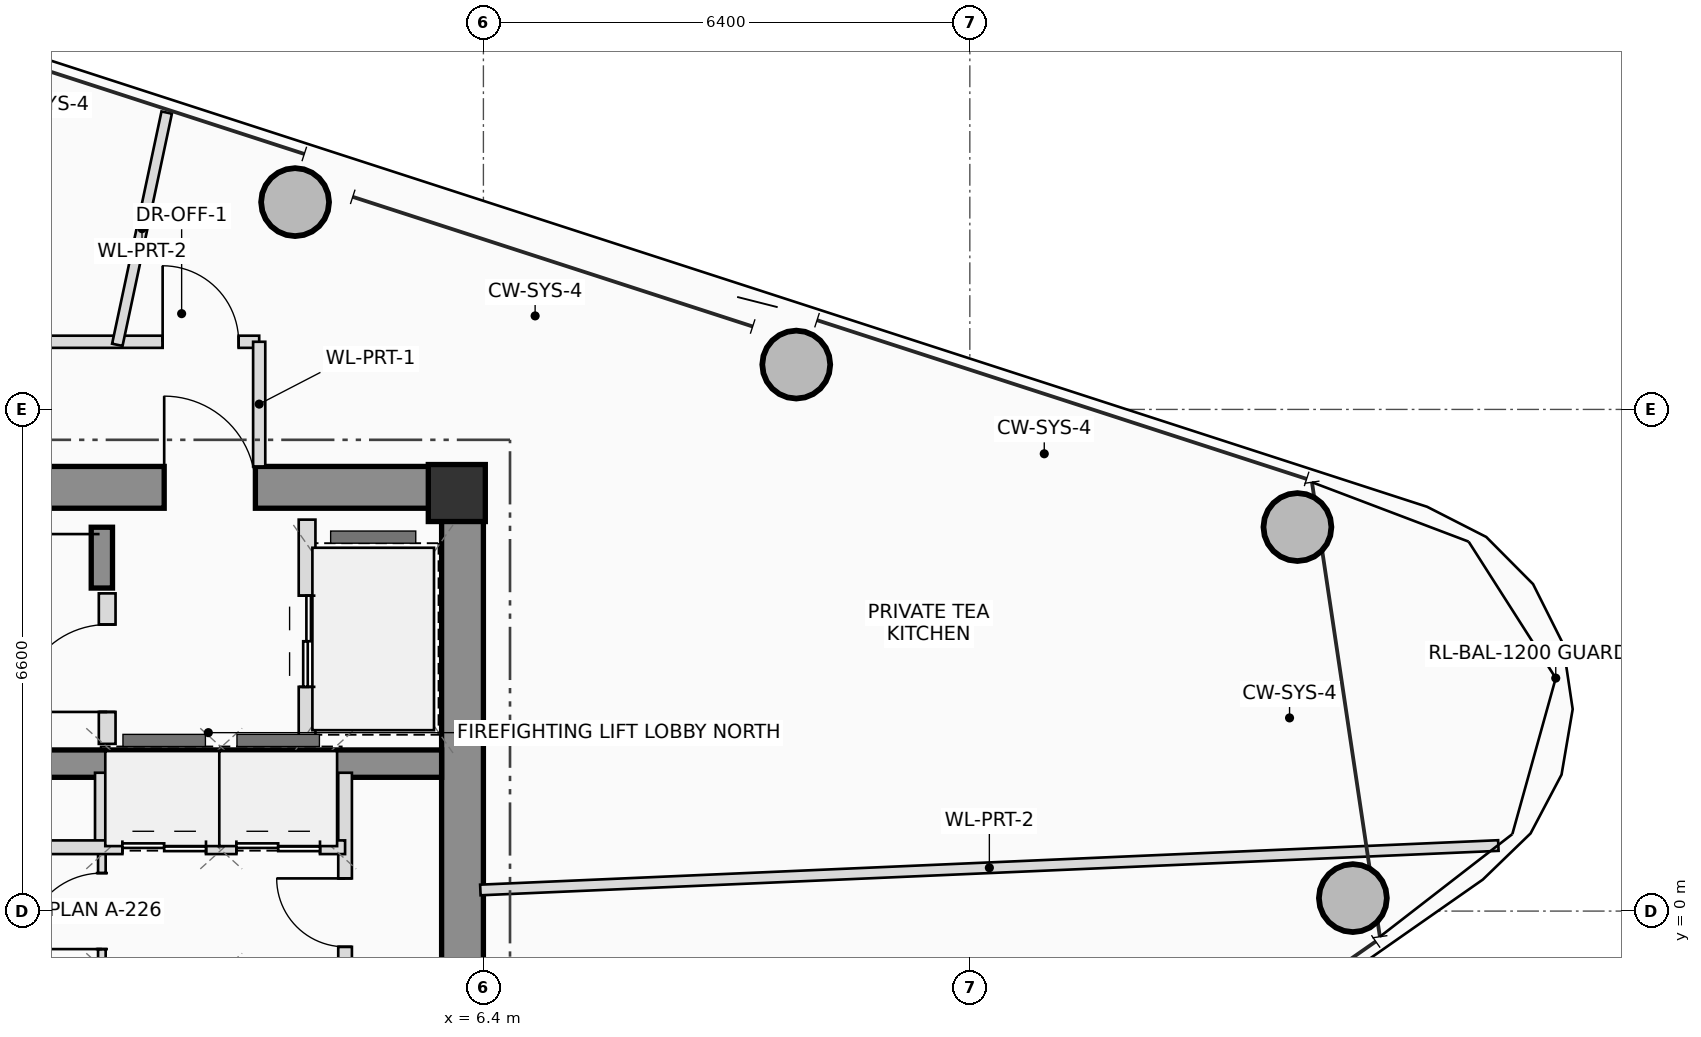
"""IFC4 building model, lengths in metres.
Left out: names, types, materials, properties, quantities, classifications, styles, units other than length and angle.
Written with IfcOpenShell. Run it as: python <this file> out.ifc"""

import sys

from ifc_helpers import new_model, si_unit, direction, frame, frame_2d, origin, origin_2d, place, context, subcontext, project, spatial, rectangle, hollow_circle, extrude, source, transform, mapped, element, fill, save


model = new_model("IFC4")
c1 = context("Model", 3, precision=1e-05, world=origin(), true_north=direction((0.0, 1.0)))
c2 = subcontext(c1, "Body", "Model", "MODEL_VIEW")
j1 = project(units=[si_unit("LENGTHUNIT", "METRE"), si_unit("PLANEANGLEUNIT", "RADIAN")], contexts=[c1])
p1 = place(None, origin())
s1 = spatial("IfcSite", under=j1, at=p1, CompositionType="ELEMENT")
p2 = place(p1, origin())
s2 = spatial("IfcBuilding", under=s1, at=p2, CompositionType="ELEMENT")
p3 = place(p2, frame((0.0, 0.0, 281.35)))
s3 = spatial("IfcBuildingStorey", under=s2, at=p3, CompositionType="ELEMENT", Elevation=281.35)
m1 = source(origin(), c2, "Body", "SweptSolid", [
    extrude(rectangle(XDim=0.75, YDim=0.75, at=origin_2d()), origin(), (0.0, 0.0, 1.0), 3.4),
])
p4 = place(p3, frame((6.05, 5.5, 0.0), z_axis=(0.0, 0.0, 1.0), x_axis=(1.0, 0.0, 0.0)))
e1 = element("IfcColumn", 1, at=p4, inside=s3, PredefinedType="COLUMN", context=c2, shape_type="MappedRepresentation", body=[
    mapped(m1, transform((0.0, 0.0, 0.0), scale=1.0)),
])
p5 = place(p3, frame((-6.4, 5.575, 0.0), z_axis=(0.0, 0.0, 1.0), x_axis=(1.0, 0.0, 0.0)))
e2 = element("IfcWall", 2, at=p5, inside=s3, PredefinedType="SHEAR", context=c2, shape_type="SweptSolid", body=[
    extrude(rectangle(XDim=12.8, YDim=0.55, at=frame_2d((6.4, 0.0))), origin(), (0.0, 0.0, 1.0), 3.4),
])
p6 = place(p5, frame((8.6, 0.0, 0.0)))
e3 = element("IfcOpeningElement", 3, at=p6, cuts=e2, PredefinedType="OPENING", context=c2, shape_type="SweptSolid", body=[
    extrude(rectangle(XDim=1.2, YDim=2.2, at=frame_2d((0.6, 1.1))), frame((0.0, 0.285, 0.0), z_axis=(0.0, -1.0, 0.0), x_axis=(1.0, 0.0, 0.0)), (0.0, 0.0, 1.0), 0.57),
])
p7 = place(p3, frame((6.125, -5.3, 0.0), z_axis=(0.0, 0.0, 1.0), x_axis=(0.0, 1.0, 0.0)))
e4 = element("IfcWall", 4, at=p7, inside=s3, PredefinedType="SHEAR", context=c2, shape_type="SweptSolid", body=[
    extrude(rectangle(XDim=10.6, YDim=0.55, at=frame_2d((5.3, 0.0))), origin(), (0.0, 0.0, 1.0), 3.4),
])
p8 = place(p3, frame((-5.85, 1.94, 0.0), z_axis=(0.0, 0.0, 1.0), x_axis=(1.0, 0.0, 0.0)))
e5 = element("IfcWall", 5, at=p8, inside=s3, PredefinedType="SHEAR", context=c2, shape_type="SweptSolid", body=[
    extrude(rectangle(XDim=11.7, YDim=0.36, at=frame_2d((5.85, 0.0))), origin(), (0.0, 0.0, 1.0), 3.4),
])
p9 = place(p3, frame((1.38, 4.25, 0.0), z_axis=(0.0, 0.0, 1.0), x_axis=(0.0, 1.0, 0.0)))
e6 = element("IfcWall", 6, at=p9, inside=s3, PredefinedType="SHEAR", context=c2, shape_type="SweptSolid", body=[
    extrude(rectangle(XDim=0.8, YDim=0.28, at=frame_2d((0.4, 0.0))), origin(), (0.0, 0.0, 1.0), 3.4),
])
m2 = source(origin(), c2, "Body", "SweptSolid", [
    extrude(hollow_circle(Radius=0.45, WallThickness=0.032, at=origin_2d()), origin(), (0.0, 0.0, 1.0), 3.4),
])
for number, where, z_axis, x_axis in (
    (7, (17.84, 0.171, 0.0), (0.0, 0.0, 1.0), (1.0, 0.0, 0.0)),
    (8, (17.11, 5.052, 0.0), (0.0, 0.0, 1.0), (1.0, 0.0, 0.0)),
    (9, (10.516, 7.19, 0.0), (0.0, 0.0, 1.0), (1.0, 0.0, 0.0)),
    (10, (3.922, 9.327, 0.0), (0.0, 0.0, 1.0), (1.0, 0.0, 0.0)),
):
    element("IfcColumn", number, at=place(p3, frame(where, z_axis=z_axis, x_axis=x_axis)), inside=s3, PredefinedType="COLUMN", context=c2, shape_type="MappedRepresentation", body=[
        mapped(m2, transform((0.0, 0.0, 0.0), scale=1.0)),
    ])
p10 = place(p3, frame((1.45, 2.2, 0.0), z_axis=(0.0, 0.0, 1.0), x_axis=(0.0, 1.0, 0.0)))
e11 = element("IfcWall", 11, at=p10, inside=s3, PredefinedType="PLUMBINGWALL", context=c2, shape_type="SweptSolid", body=[
    extrude(rectangle(XDim=1.98, YDim=0.22, at=frame_2d((0.99, 0.0))), origin(), (0.0, 0.0, 1.0), 3.16),
])
p11 = place(p10, frame((0.42, 0.0, 0.0)))
e12 = element("IfcOpeningElement", 12, at=p11, cuts=e11, PredefinedType="OPENING", context=c2, shape_type="SweptSolid", body=[
    extrude(rectangle(XDim=1.15, YDim=2.15, at=frame_2d((0.575, 1.075))), frame((0.0, 0.12, 0.0), z_axis=(0.0, -1.0, 0.0), x_axis=(1.0, 0.0, 0.0)), (0.0, 0.0, 1.0), 0.24),
])
p12 = place(p3, frame((4.08, 2.2, 0.0), z_axis=(0.0, 0.0, 1.0), x_axis=(0.0, 1.0, 0.0)))
e13 = element("IfcWall", 13, at=p12, inside=s3, PredefinedType="PLUMBINGWALL", context=c2, shape_type="SweptSolid", body=[
    extrude(rectangle(XDim=2.95, YDim=0.22, at=frame_2d((1.475, 0.0))), origin(), (0.0, 0.0, 1.0), 3.16),
])
p13 = place(p12, frame((0.75, 0.0, 0.0)))
e14 = element("IfcOpeningElement", 14, at=p13, cuts=e13, PredefinedType="OPENING", context=c2, shape_type="SweptSolid", body=[
    extrude(rectangle(XDim=1.2, YDim=2.25, at=frame_2d((0.6, 1.125))), frame((0.0, 0.12, 0.0), z_axis=(0.0, -1.0, 0.0), x_axis=(1.0, 0.0, 0.0)), (0.0, 0.0, 1.0), 0.24),
])
p14 = place(p3, frame((1.38, -0.84, 0.0), z_axis=(0.0, 0.0, 1.0), x_axis=(0.0, 1.0, 0.0)))
e15 = element("IfcWall", 15, at=p14, inside=s3, PredefinedType="PARTITIONING", context=c2, shape_type="SweptSolid", body=[
    extrude(rectangle(XDim=1.68, YDim=0.1, at=frame_2d((0.84, 0.0))), origin(), (0.0, 0.0, 1.0), 3.16),
])
p15 = place(p14, frame((0.34, 0.0, 0.0)))
e16 = element("IfcOpeningElement", 16, at=p15, cuts=e15, PredefinedType="OPENING", context=c2, shape_type="SweptSolid", body=[
    extrude(rectangle(XDim=1.0, YDim=2.25, at=frame_2d((0.5, 1.125))), frame((0.0, 0.06, 0.0), z_axis=(0.0, -1.0, 0.0), x_axis=(1.0, 0.0, 0.0)), (0.0, 0.0, 1.0), 0.12),
])
for number, where, z_axis, x_axis in (
    (17, (1.38, 0.84, 0.0), (0.0, 0.0, 1.0), (0.0, 1.0, 0.0)),
    (18, (3.02, 0.84, 0.0), (0.0, 0.0, 1.0), (0.0, 1.0, 0.0)),
    (19, (4.38, 0.84, 0.0), (0.0, 0.0, 1.0), (0.0, 1.0, 0.0)),
):
    element("IfcWall", number, at=place(p3, frame(where, z_axis=z_axis, x_axis=x_axis)), inside=s3, PredefinedType="PLUMBINGWALL", context=c2, shape_type="SweptSolid", body=[
        extrude(rectangle(XDim=0.98, YDim=0.18, at=frame_2d((0.49, 0.0))), origin(), (0.0, 0.0, 1.0), 3.16),
    ])
p16 = place(p3, frame((4.58, -1.82, 0.0), z_axis=(0.0, 0.0, 1.0), x_axis=(0.0, 1.0, 0.0)))
e20 = element("IfcWall", 20, at=p16, inside=s3, PredefinedType="PLUMBINGWALL", context=c2, shape_type="SweptSolid", body=[
    extrude(rectangle(XDim=3.64, YDim=0.18, at=frame_2d((1.82, 0.0))), origin(), (0.0, 0.0, 1.0), 3.16),
])
p17 = place(p16, frame((1.35, 0.0, 0.0)))
e21 = element("IfcOpeningElement", 21, at=p17, cuts=e20, PredefinedType="OPENING", context=c2, shape_type="SweptSolid", body=[
    extrude(rectangle(XDim=0.9, YDim=2.05, at=frame_2d((0.45, 1.025))), frame((0.0, 0.1, 0.0), z_axis=(0.0, -1.0, 0.0), x_axis=(1.0, 0.0, 0.0)), (0.0, 0.0, 1.0), 0.2),
])
p18 = place(p3, frame((-5.68, 0.84, 0.0), z_axis=(0.0, 0.0, 1.0), x_axis=(1.0, 0.0, 0.0)))
e22 = element("IfcWall", 22, at=p18, inside=s3, PredefinedType="PLUMBINGWALL", context=c2, shape_type="SweptSolid", body=[
    extrude(rectangle(XDim=10.26, YDim=0.18, at=frame_2d((5.13, 0.0))), origin(), (0.0, 0.0, 1.0), 3.16),
])
p19 = place(p18, frame((0.91, 0.0, 0.0)))
e23 = element("IfcOpeningElement", 23, at=p19, cuts=e22, PredefinedType="OPENING", context=c2, shape_type="SweptSolid", body=[
    extrude(rectangle(XDim=0.9, YDim=2.05, at=frame_2d((0.45, 1.025))), frame((0.0, 0.1, 0.0), z_axis=(0.0, -1.0, 0.0), x_axis=(1.0, 0.0, 0.0)), (0.0, 0.0, 1.0), 0.2),
])
p20 = place(p18, frame((4.38, 0.0, 0.0)))
e24 = element("IfcOpeningElement", 24, at=p20, cuts=e22, PredefinedType="OPENING", context=c2, shape_type="SweptSolid", body=[
    extrude(rectangle(XDim=0.9, YDim=2.05, at=frame_2d((0.45, 1.025))), frame((0.0, 0.1, 0.0), z_axis=(0.0, -1.0, 0.0), x_axis=(1.0, 0.0, 0.0)), (0.0, 0.0, 1.0), 0.2),
])
p21 = place(p18, frame((7.33, 0.0, 0.0)))
e25 = element("IfcOpeningElement", 25, at=p21, cuts=e22, PredefinedType="OPENING", context=c2, shape_type="SweptSolid", body=[
    extrude(rectangle(XDim=1.1, YDim=2.2, at=frame_2d((0.55, 1.1))), frame((0.0, 0.1, 0.0), z_axis=(0.0, -1.0, 0.0), x_axis=(1.0, 0.0, 0.0)), (0.0, 0.0, 1.0), 0.2),
])
p22 = place(p18, frame((8.83, 0.0, 0.0)))
e26 = element("IfcOpeningElement", 26, at=p22, cuts=e22, PredefinedType="OPENING", context=c2, shape_type="SweptSolid", body=[
    extrude(rectangle(XDim=1.1, YDim=2.2, at=frame_2d((0.55, 1.1))), frame((0.0, 0.1, 0.0), z_axis=(0.0, -1.0, 0.0), x_axis=(1.0, 0.0, 0.0)), (0.0, 0.0, 1.0), 0.2),
])
p23 = place(p3, frame((-6.36, 7.49, 0.0), z_axis=(0.0, 0.0, 1.0), x_axis=(1.0, 0.0, 0.0)))
e27 = element("IfcWall", 27, at=p23, inside=s3, PredefinedType="PARTITIONING", context=c2, shape_type="SweptSolid", body=[
    extrude(rectangle(XDim=9.81, YDim=0.16, at=frame_2d((4.905, 0.0))), origin(), (0.0, 0.0, 1.0), 2.565),
])
p24 = place(p23, frame((4.253, 0.0, 0.0)))
e28 = element("IfcOpeningElement", 28, at=p24, cuts=e27, PredefinedType="OPENING", context=c2, shape_type="SweptSolid", body=[
    extrude(rectangle(XDim=1.0, YDim=2.25, at=frame_2d((0.5, 1.125))), frame((0.0, 0.09, 0.0), z_axis=(0.0, -1.0, 0.0), x_axis=(1.0, 0.0, 0.0)), (0.0, 0.0, 1.0), 0.18),
])
p25 = place(p23, frame((8.54, 0.0, 0.0)))
e29 = element("IfcOpeningElement", 29, at=p25, cuts=e27, PredefinedType="OPENING", context=c2, shape_type="SweptSolid", body=[
    extrude(rectangle(XDim=1.0, YDim=2.25, at=frame_2d((0.5, 1.125))), frame((0.0, 0.09, 0.0), z_axis=(0.0, -1.0, 0.0), x_axis=(1.0, 0.0, 0.0)), (0.0, 0.0, 1.0), 0.18),
])
p26 = place(p3, frame((3.45, 7.49, 0.0), z_axis=(0.0, 0.0, 1.0), x_axis=(0.0, -1.0, 0.0)))
e30 = element("IfcWall", 30, at=p26, inside=s3, PredefinedType="PARTITIONING", context=c2, shape_type="SweptSolid", body=[
    extrude(rectangle(XDim=1.64, YDim=0.16, at=frame_2d((0.82, 0.0))), origin(), (0.0, 0.0, 1.0), 2.765),
])
p27 = place(p3, frame((6.36, 0.278, 0.0), z_axis=(0.0, 0.0, 1.0), x_axis=(0.999047617824, 0.043633213494, 0.0)))
e31 = element("IfcWall", 31, at=p27, inside=s3, PredefinedType="PARTITIONING", context=c2, shape_type="SweptSolid", body=[
    extrude(rectangle(XDim=13.406, YDim=0.14, at=frame_2d((6.703, 0.0))), origin(), (0.0, 0.0, 1.0), 2.565),
])
p28 = place(p3, frame((1.583, 7.45, 0.0), z_axis=(0.0, 0.0, 1.0), x_axis=(0.20788492722, 0.978153289129, 0.0)))
e32 = element("IfcWall", 32, at=p28, inside=s3, PredefinedType="PARTITIONING", context=c2, shape_type="SweptSolid", body=[
    extrude(rectangle(XDim=3.124, YDim=0.14, at=frame_2d((1.562, 0.0))), origin(), (0.0, 0.0, 1.0), 2.725),
])
p29 = place(p6, origin())
e33 = element("IfcDoor", 33, at=p29, inside=s3, OperationType="SINGLE_SWING_LEFT", PredefinedType="DOOR", context=c2, shape_type="SweptSolid", body=[
    extrude(rectangle(XDim=1.2, YDim=2.2, at=frame_2d((0.6, 1.1))), frame((0.0, 0.025, 0.0), z_axis=(0.0, -1.0, 0.0), x_axis=(1.0, 0.0, 0.0)), (0.0, 0.0, 1.0), 0.05),
])
fill(e3, e33)
p30 = place(p11, origin())
e34 = element("IfcDoor", 34, at=p30, inside=s3, OperationType="SINGLE_SWING_LEFT", PredefinedType="DOOR", context=c2, shape_type="SweptSolid", body=[
    extrude(rectangle(XDim=1.15, YDim=2.15, at=frame_2d((0.575, 1.075))), frame((0.0, 0.025, 0.0), z_axis=(0.0, -1.0, 0.0), x_axis=(1.0, 0.0, 0.0)), (0.0, 0.0, 1.0), 0.05),
])
fill(e12, e34)
p31 = place(p13, origin())
e35 = element("IfcDoor", 35, at=p31, inside=s3, OperationType="DOUBLE_DOOR_SLIDING", PredefinedType="DOOR", context=c2, shape_type="SweptSolid", body=[
    extrude(rectangle(XDim=1.2, YDim=2.25, at=frame_2d((0.6, 1.125))), frame((0.0, 0.025, 0.0), z_axis=(0.0, -1.0, 0.0), x_axis=(1.0, 0.0, 0.0)), (0.0, 0.0, 1.0), 0.05),
])
fill(e14, e35)
p32 = place(p15, origin())
e36 = element("IfcDoor", 36, at=p32, inside=s3, OperationType="SINGLE_SWING_LEFT", PredefinedType="DOOR", context=c2, shape_type="SweptSolid", body=[
    extrude(rectangle(XDim=1.0, YDim=2.25, at=frame_2d((0.5, 1.125))), frame((0.0, 0.025, 0.0), z_axis=(0.0, -1.0, 0.0), x_axis=(1.0, 0.0, 0.0)), (0.0, 0.0, 1.0), 0.05),
])
fill(e16, e36)
p33 = place(p17, origin())
e37 = element("IfcDoor", 37, at=p33, inside=s3, OperationType="SINGLE_SWING_RIGHT", PredefinedType="DOOR", context=c2, shape_type="SweptSolid", body=[
    extrude(rectangle(XDim=0.9, YDim=2.05, at=frame_2d((0.45, 1.025))), frame((0.0, 0.025, 0.0), z_axis=(0.0, -1.0, 0.0), x_axis=(1.0, 0.0, 0.0)), (0.0, 0.0, 1.0), 0.05),
])
fill(e21, e37)
p34 = place(p21, origin())
e38 = element("IfcDoor", 38, at=p34, inside=s3, OperationType="DOUBLE_DOOR_SLIDING", PredefinedType="DOOR", context=c2, shape_type="SweptSolid", body=[
    extrude(rectangle(XDim=1.1, YDim=2.2, at=frame_2d((0.55, 1.1))), frame((0.0, 0.025, 0.0), z_axis=(0.0, -1.0, 0.0), x_axis=(1.0, 0.0, 0.0)), (0.0, 0.0, 1.0), 0.05),
])
fill(e25, e38)
p35 = place(p22, origin())
e39 = element("IfcDoor", 39, at=p35, inside=s3, OperationType="DOUBLE_DOOR_SLIDING", PredefinedType="DOOR", context=c2, shape_type="SweptSolid", body=[
    extrude(rectangle(XDim=1.1, YDim=2.2, at=frame_2d((0.55, 1.1))), frame((0.0, 0.025, 0.0), z_axis=(0.0, -1.0, 0.0), x_axis=(1.0, 0.0, 0.0)), (0.0, 0.0, 1.0), 0.05),
])
fill(e26, e39)
p36 = place(p25, origin())
e40 = element("IfcDoor", 40, at=p36, inside=s3, OperationType="SINGLE_SWING_LEFT", PredefinedType="DOOR", context=c2, shape_type="SweptSolid", body=[
    extrude(rectangle(XDim=1.0, YDim=2.25, at=frame_2d((0.5, 1.125))), frame((0.0, 0.025, 0.0), z_axis=(0.0, -1.0, 0.0), x_axis=(1.0, 0.0, 0.0)), (0.0, 0.0, 1.0), 0.05),
])
fill(e29, e40)
save(model, sys.argv[1])
